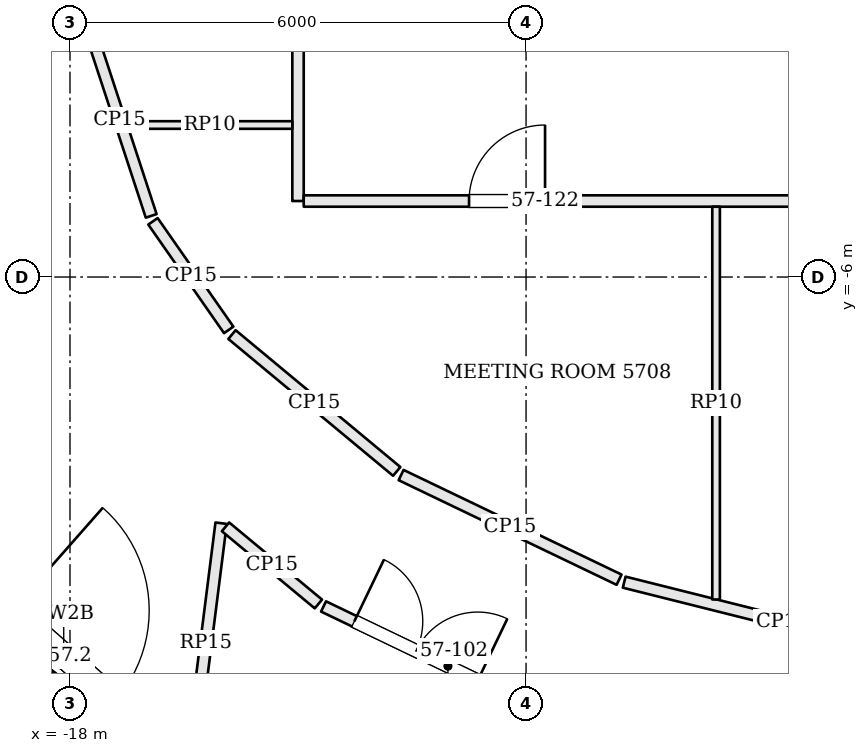
"""IFC4 building model, lengths in metres.
Left out: names, types, materials, properties, quantities, classifications, styles, units other than length and angle.
Written with IfcOpenShell. Run it as: python <this file> out.ifc"""

import sys

from ifc_helpers import new_model, si_unit, direction, frame, frame_2d, origin, place, context, subcontext, project, spatial, rectangle, extrude, element, fill, save


model = new_model("IFC4")
c1 = context("Model", 3, precision=1e-05, world=origin(), true_north=direction((0.0, 1.0)))
c2 = subcontext(c1, "Body", "Model", "MODEL_VIEW")
j1 = project(units=[si_unit("LENGTHUNIT", "METRE"), si_unit("PLANEANGLEUNIT", "RADIAN")], contexts=[c1])
p1 = place(None, origin())
s1 = spatial("IfcSite", under=j1, at=p1, CompositionType="ELEMENT")
p2 = place(p1, origin())
s2 = spatial("IfcBuilding", under=s1, at=p2, CompositionType="ELEMENT")
p3 = place(p2, frame((0.0, 0.0, 233.1)))
s3 = spatial("IfcBuildingStorey", under=s2, at=p3, CompositionType="ELEMENT", Elevation=233.1)
p4 = place(p3, frame((-19.399, -9.823, 0.0), z_axis=(0.0, 0.0, 1.0), x_axis=(0.750603055011, -0.660753398635, 0.0)))
e1 = element("IfcWall", 1, at=p4, inside=s3, PredefinedType="SOLIDWALL", context=c2, shape_type="SweptSolid", body=[
    extrude(rectangle(XDim=3.508, YDim=0.3, at=frame_2d((1.754, 0.0))), origin(), (0.0, 0.0, 1.0), 3.104),
])
p5 = place(p4, frame((0.854, 0.0, 0.0)))
e2 = element("IfcOpeningElement", 2, at=p5, cuts=e1, PredefinedType="OPENING", context=c2, shape_type="SweptSolid", body=[
    extrude(rectangle(XDim=1.8, YDim=2.4, at=frame_2d((0.9, 1.2))), frame((0.0, 0.16, 0.0), z_axis=(0.0, -1.0, 0.0), x_axis=(1.0, 0.0, 0.0)), (0.0, 0.0, 1.0), 0.32),
])
p6 = place(p3, frame((-16.41, -12.385, 0.0), z_axis=(0.0, 0.0, 1.0), x_axis=(0.125540868956, 0.99208844879, 0.0)))
e3 = element("IfcWall", 3, at=p6, inside=s3, PredefinedType="PARTITIONING", context=c2, shape_type="SweptSolid", body=[
    extrude(rectangle(XDim=3.172, YDim=0.15, at=frame_2d((1.586, 0.0))), origin(), (0.0, 0.0, 1.0), 3.084),
])
p7 = place(p3, frame((-15.954, -9.286, 0.0), z_axis=(0.0, 0.0, 1.0), x_axis=(0.769253118358, -0.638944160234, 0.0)))
e4 = element("IfcWall", 4, at=p7, inside=s3, PredefinedType="PARTITIONING", context=c2, shape_type="SweptSolid", body=[
    extrude(rectangle(XDim=1.589, YDim=0.15, at=frame_2d((0.794, 0.0))), origin(), (0.0, 0.0, 1.0), 3.084),
])
p8 = place(p3, frame((-14.664, -10.334, 0.0), z_axis=(0.0, 0.0, 1.0), x_axis=(0.901507315282, -0.432763862278, 0.0)))
e5 = element("IfcWall", 5, at=p8, inside=s3, PredefinedType="PARTITIONING", context=c2, shape_type="SweptSolid", body=[
    extrude(rectangle(XDim=3.63, YDim=0.15, at=frame_2d((1.815, 0.0))), origin(), (0.0, 0.0, 1.0), 3.084),
])
p9 = place(p8, frame((0.45, 0.0, 0.0)))
e6 = element("IfcOpeningElement", 6, at=p9, cuts=e5, PredefinedType="OPENING", context=c2, shape_type="SweptSolid", body=[
    extrude(rectangle(XDim=1.8, YDim=2.1, at=frame_2d((0.9, 1.05))), frame((0.0, 0.085, 0.0), z_axis=(0.0, -1.0, 0.0), x_axis=(1.0, 0.0, 0.0)), (0.0, 0.0, 1.0), 0.17),
])
p10 = place(p3, frame((-6.553, -11.056, 0.0), z_axis=(0.0, 0.0, 1.0), x_axis=(-0.970004917182, 0.243085294995, 0.0)))
e7 = element("IfcWall", 7, at=p10, inside=s3, PredefinedType="PARTITIONING", context=c2, shape_type="SweptSolid", body=[
    extrude(rectangle(XDim=4.284, YDim=0.15, at=frame_2d((2.142, 0.0))), origin(), (0.0, 0.0, 1.0), 3.084),
])
p11 = place(p3, frame((-10.776, -9.982, 0.0), z_axis=(0.0, 0.0, 1.0), x_axis=(-0.901511079436, 0.432756020933, 0.0)))
e8 = element("IfcWall", 8, at=p11, inside=s3, PredefinedType="PARTITIONING", context=c2, shape_type="SweptSolid", body=[
    extrude(rectangle(XDim=3.181, YDim=0.15, at=frame_2d((1.59, 0.0))), origin(), (0.0, 0.0, 1.0), 3.084),
])
p12 = place(p3, frame((-13.702, -8.557, 0.0), z_axis=(0.0, 0.0, 1.0), x_axis=(-0.769221825067, 0.638981833733, 0.0)))
e9 = element("IfcWall", 9, at=p12, inside=s3, PredefinedType="PARTITIONING", context=c2, shape_type="SweptSolid", body=[
    extrude(rectangle(XDim=2.817, YDim=0.15, at=frame_2d((1.409, 0.0))), origin(), (0.0, 0.0, 1.0), 3.084),
])
p13 = place(p3, frame((-15.912, -6.696, 0.0), z_axis=(0.0, 0.0, 1.0), x_axis=(-0.572078533763, 0.820198848578, 0.0)))
e10 = element("IfcWall", 10, at=p13, inside=s3, PredefinedType="PARTITIONING", context=c2, shape_type="SweptSolid", body=[
    extrude(rectangle(XDim=1.742, YDim=0.15, at=frame_2d((0.871, 0.0))), origin(), (0.0, 0.0, 1.0), 3.084),
])
p14 = place(p3, frame((-16.932, -5.196, 0.0), z_axis=(0.0, 0.0, 1.0), x_axis=(-0.311904957484, 0.950113307715, 0.0)))
e11 = element("IfcWall", 11, at=p14, inside=s3, PredefinedType="PARTITIONING", context=c2, shape_type="SweptSolid", body=[
    extrude(rectangle(XDim=2.662, YDim=0.15, at=frame_2d((1.331, 0.0))), origin(), (0.0, 0.0, 1.0), 3.084),
])
p15 = place(p3, frame((-15.0, 7.423, 0.0), z_axis=(0.0, 0.0, 1.0), x_axis=(0.0, -1.0, 0.0)))
e12 = element("IfcWall", 12, at=p15, inside=s3, PredefinedType="PARTITIONING", context=c2, shape_type="SweptSolid", body=[
    extrude(rectangle(XDim=12.423, YDim=0.15, at=frame_2d((6.211, 0.0))), origin(), (0.0, 0.0, 1.0), 3.084),
])
p16 = place(p15, frame((5.174, 0.0, 0.0)))
e13 = element("IfcOpeningElement", 13, at=p16, cuts=e12, PredefinedType="OPENING", context=c2, shape_type="SweptSolid", body=[
    extrude(rectangle(XDim=1.0, YDim=2.1, at=frame_2d((0.5, 1.05))), frame((0.0, 0.085, 0.0), z_axis=(0.0, -1.0, 0.0), x_axis=(1.0, 0.0, 0.0)), (0.0, 0.0, 1.0), 0.17),
])
p17 = place(p3, frame((-14.925, -5.0, 0.0), z_axis=(0.0, 0.0, 1.0), x_axis=(1.0, 0.0, 0.0)))
e14 = element("IfcWall", 14, at=p17, inside=s3, PredefinedType="PARTITIONING", context=c2, shape_type="SweptSolid", body=[
    extrude(rectangle(XDim=29.925, YDim=0.15, at=frame_2d((14.962, 0.0))), origin(), (0.0, 0.0, 1.0), 3.084),
])
p18 = place(p17, frame((2.175, 0.0, 0.0)))
e15 = element("IfcOpeningElement", 15, at=p18, cuts=e14, PredefinedType="OPENING", context=c2, shape_type="SweptSolid", body=[
    extrude(rectangle(XDim=1.0, YDim=2.4, at=frame_2d((0.5, 1.2))), frame((0.0, 0.085, 0.0), z_axis=(0.0, -1.0, 0.0), x_axis=(1.0, 0.0, 0.0)), (0.0, 0.0, 1.0), 0.17),
])
p19 = place(p17, frame((14.025, 0.0, 0.0)))
e16 = element("IfcOpeningElement", 16, at=p19, cuts=e14, PredefinedType="OPENING", context=c2, shape_type="SweptSolid", body=[
    extrude(rectangle(XDim=1.8, YDim=2.1, at=frame_2d((0.9, 1.05))), frame((0.0, 0.085, 0.0), z_axis=(0.0, -1.0, 0.0), x_axis=(1.0, 0.0, 0.0)), (0.0, 0.0, 1.0), 0.17),
])
p20 = place(p17, frame((26.825, 0.0, 0.0)))
e17 = element("IfcOpeningElement", 17, at=p20, cuts=e14, PredefinedType="OPENING", context=c2, shape_type="SweptSolid", body=[
    extrude(rectangle(XDim=0.7, YDim=2.1, at=frame_2d((0.35, 1.05))), frame((0.0, 0.085, 0.0), z_axis=(0.0, -1.0, 0.0), x_axis=(1.0, 0.0, 0.0)), (0.0, 0.0, 1.0), 0.17),
])
p21 = place(p3, frame((-9.5, -10.242, 0.0), z_axis=(0.0, 0.0, 1.0), x_axis=(0.0, 1.0, 0.0)))
e18 = element("IfcWall", 18, at=p21, inside=s3, PredefinedType="PARTITIONING", context=c2, shape_type="SweptSolid", body=[
    extrude(rectangle(XDim=5.167, YDim=0.1, at=frame_2d((2.583, 0.0))), origin(), (0.0, 0.0, 1.0), 3.084),
])
p22 = place(p3, frame((-17.249, -4.0, 0.0), z_axis=(0.0, 0.0, 1.0), x_axis=(1.0, 0.0, 0.0)))
e19 = element("IfcWall", 19, at=p22, inside=s3, PredefinedType="PARTITIONING", context=c2, shape_type="SweptSolid", body=[
    extrude(rectangle(XDim=2.174, YDim=0.1, at=frame_2d((1.087, 0.0))), origin(), (0.0, 0.0, 1.0), 3.084),
])
p23 = place(p5, origin())
e20 = element("IfcDoor", 20, at=p23, inside=s3, OperationType="DOUBLE_DOOR_DOUBLE_SWING", PredefinedType="DOOR", context=c2, shape_type="SweptSolid", body=[
    extrude(rectangle(XDim=1.8, YDim=2.4, at=frame_2d((0.9, 1.2))), frame((0.0, 0.025, 0.0), z_axis=(0.0, -1.0, 0.0), x_axis=(1.0, 0.0, 0.0)), (0.0, 0.0, 1.0), 0.05),
])
fill(e2, e20)
p24 = place(p9, origin())
e21 = element("IfcDoor", 21, at=p24, inside=s3, OperationType="DOUBLE_DOOR_SINGLE_SWING", PredefinedType="DOOR", context=c2, shape_type="SweptSolid", body=[
    extrude(rectangle(XDim=1.8, YDim=2.1, at=frame_2d((0.9, 1.05))), frame((0.0, 0.025, 0.0), z_axis=(0.0, -1.0, 0.0), x_axis=(1.0, 0.0, 0.0)), (0.0, 0.0, 1.0), 0.05),
])
fill(e6, e21)
p25 = place(p18, origin())
e22 = element("IfcDoor", 22, at=p25, inside=s3, OperationType="SINGLE_SWING_RIGHT", PredefinedType="DOOR", context=c2, shape_type="SweptSolid", body=[
    extrude(rectangle(XDim=1.0, YDim=2.4, at=frame_2d((0.5, 1.2))), frame((0.0, 0.025, 0.0), z_axis=(0.0, -1.0, 0.0), x_axis=(1.0, 0.0, 0.0)), (0.0, 0.0, 1.0), 0.05),
])
fill(e15, e22)
save(model, sys.argv[1])
